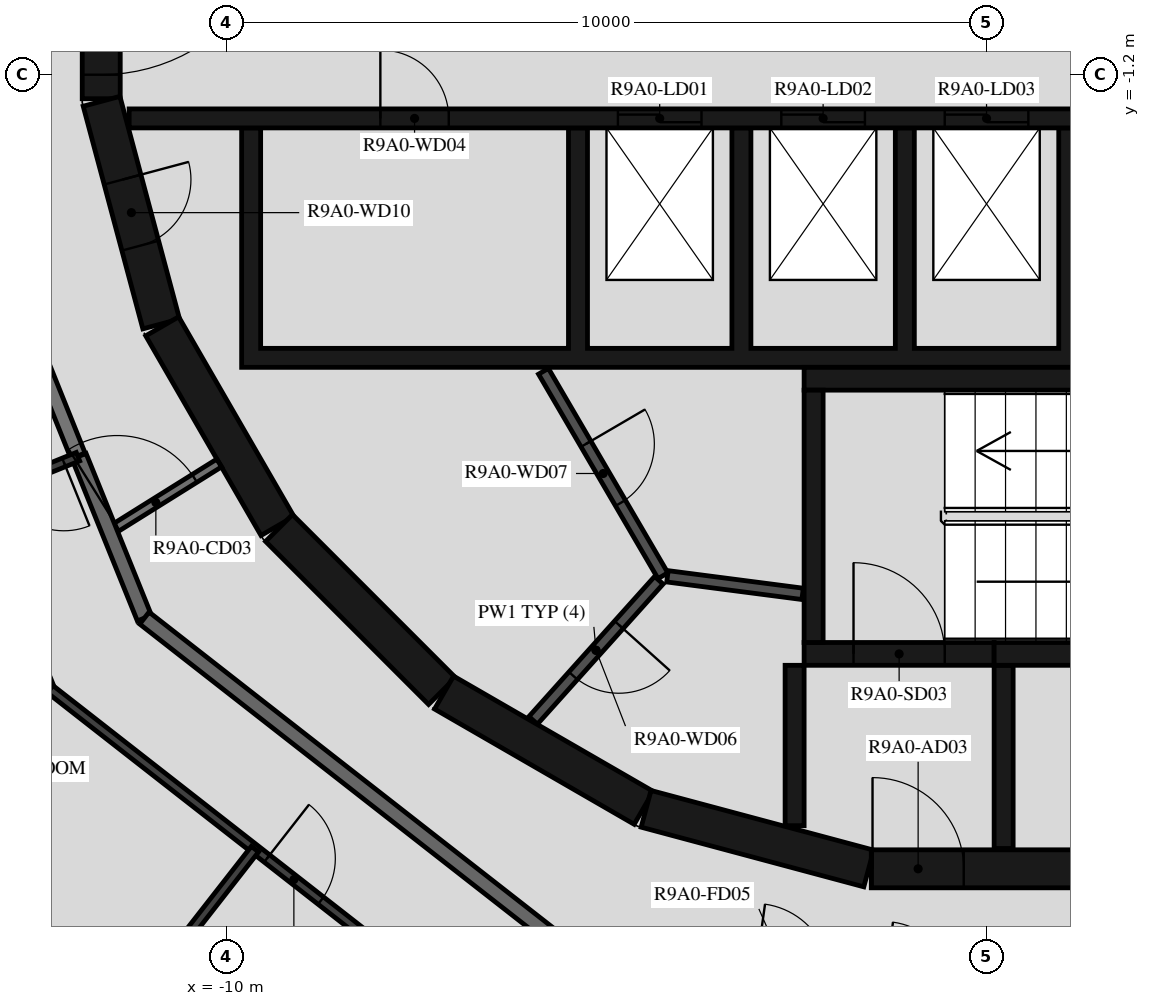
"""IFC4 building model, lengths in metres.
Left out: names, types, materials, properties, quantities, classifications, styles, units other than length and angle.
Written with IfcOpenShell. Run it as: python <this file> out.ifc"""

import sys

from ifc_helpers import new_model, si_unit, direction, frame, frame_2d, origin, place, context, subcontext, project, spatial, polyline, rectangle, outline, extrude, element, fill, save


model = new_model("IFC4")
c1 = context("Model", 3, precision=1e-05, world=origin(), true_north=direction((0.0, 1.0)))
c2 = subcontext(c1, "Body", "Model", "MODEL_VIEW")
j1 = project(units=[si_unit("LENGTHUNIT", "METRE"), si_unit("PLANEANGLEUNIT", "RADIAN")], contexts=[c1])
p1 = place(None, origin())
s1 = spatial("IfcSite", under=j1, at=p1, CompositionType="ELEMENT")
p2 = place(p1, origin())
s2 = spatial("IfcBuilding", under=s1, at=p2, CompositionType="ELEMENT")
p3 = place(p2, frame((0.0, 0.0, 333.0)))
s3 = spatial("IfcBuildingStorey", under=s2, at=p3, CompositionType="ELEMENT", Elevation=333.0)
p4 = place(p3, frame((-11.647, 1.516, 0.0), z_axis=(0.0, 0.0, 1.0), x_axis=(0.0, -1.0, 0.0)))
e1 = element("IfcWall", 1, at=p4, inside=s3, PredefinedType="SHEAR", context=c2, shape_type="SweptSolid", body=[
    extrude(rectangle(XDim=3.033, YDim=0.5, at=frame_2d((1.516, 0.0))), origin(), (0.0, 0.0, 1.0), 3.12),
])
p5 = place(p4, frame((0.316, 0.0, 0.0)))
e2 = element("IfcOpeningElement", 2, at=p5, cuts=e1, PredefinedType="OPENING", context=c2, shape_type="SweptSolid", body=[
    extrude(rectangle(XDim=2.4, YDim=2.1, at=frame_2d((1.2, 1.05))), frame((0.0, 0.26, 0.0), z_axis=(0.0, -1.0, 0.0), x_axis=(1.0, 0.0, 0.0)), (0.0, 0.0, 1.0), 0.52),
])
p6 = place(p3, frame((-11.643, -1.55, 0.0), z_axis=(0.0, 0.0, 1.0), x_axis=(0.258734743916, -0.965948410781, 0.0)))
e3 = element("IfcWall", 3, at=p6, inside=s3, PredefinedType="SHEAR", context=c2, shape_type="SweptSolid", body=[
    extrude(rectangle(XDim=3.033, YDim=0.5, at=frame_2d((1.516, 0.0))), origin(), (0.0, 0.0, 1.0), 3.12),
])
p7 = place(p6, frame((1.066, 0.0, 0.0)))
e4 = element("IfcOpeningElement", 4, at=p7, cuts=e3, PredefinedType="OPENING", context=c2, shape_type="SweptSolid", body=[
    extrude(rectangle(XDim=0.9, YDim=2.1, at=frame_2d((0.45, 1.05))), frame((0.0, 0.26, 0.0), z_axis=(0.0, -1.0, 0.0), x_axis=(1.0, 0.0, 0.0)), (0.0, 0.0, 1.0), 0.52),
])
p8 = place(p3, frame((-10.845, -4.51, 0.0), z_axis=(0.0, 0.0, 1.0), x_axis=(0.500087131594, -0.865975092491, 0.0)))
e5 = element("IfcWall", 5, at=p8, inside=s3, PredefinedType="SHEAR", context=c2, shape_type="SweptSolid", body=[
    extrude(rectangle(XDim=3.033, YDim=0.5, at=frame_2d((1.516, 0.0))), origin(), (0.0, 0.0, 1.0), 3.12),
])
p9 = place(p3, frame((-9.308, -7.164, 0.0), z_axis=(0.0, 0.0, 1.0), x_axis=(0.707106781187, -0.707106781187, 0.0)))
e6 = element("IfcWall", 6, at=p9, inside=s3, PredefinedType="SHEAR", context=c2, shape_type="SweptSolid", body=[
    extrude(rectangle(XDim=3.032, YDim=0.5, at=frame_2d((1.516, 0.0))), origin(), (0.0, 0.0, 1.0), 3.12),
])
for number, where, z_axis, x_axis in (
    (7, (-7.137, -9.329, 0.0), (0.0, 0.0, 1.0), (0.866, -0.5, 0.0)),
    (8, (-4.479, -10.858, 0.0), (0.0, 0.0, 1.0), (0.966, -0.259, 0.0)),
):
    element("IfcWall", number, at=place(p3, frame(where, z_axis=z_axis, x_axis=x_axis)), inside=s3, PredefinedType="SHEAR", context=c2, shape_type="SweptSolid", body=[
        extrude(rectangle(XDim=3.033, YDim=0.5, at=frame_2d((1.516, 0.0))), origin(), (0.0, 0.0, 1.0), 3.12),
    ])
p10 = place(p3, frame((-1.516, -11.647, 0.0), z_axis=(0.0, 0.0, 1.0), x_axis=(1.0, 0.0, 0.0)))
e9 = element("IfcWall", 9, at=p10, inside=s3, PredefinedType="SHEAR", context=c2, shape_type="SweptSolid", body=[
    extrude(rectangle(XDim=3.033, YDim=0.5, at=frame_2d((1.516, 0.0))), origin(), (0.0, 0.0, 1.0), 3.12),
])
p11 = place(p10, frame((0.016, 0.0, 0.0)))
e10 = element("IfcOpeningElement", 10, at=p11, cuts=e9, PredefinedType="OPENING", context=c2, shape_type="SweptSolid", body=[
    extrude(rectangle(XDim=1.2, YDim=2.1, at=frame_2d((0.6, 1.05))), frame((0.0, 0.26, 0.0), z_axis=(0.0, -1.0, 0.0), x_axis=(1.0, 0.0, 0.0)), (0.0, 0.0, 1.0), 0.52),
])
p12 = place(p3, frame((-2.275, -8.67, 0.0), z_axis=(0.0, 0.0, 1.0), x_axis=(0.0, 1.0, 0.0)))
e11 = element("IfcWall", 11, at=p12, inside=s3, PredefinedType="SHEAR", context=c2, shape_type="SweptSolid", body=[
    extrude(rectangle(XDim=3.32, YDim=0.25, at=frame_2d((1.66, 0.0))), origin(), (0.0, 0.0, 1.0), 3.12),
])
p13 = place(p3, frame((-2.4, -5.2, 0.0), z_axis=(0.0, 0.0, 1.0), x_axis=(1.0, 0.0, 0.0)))
e12 = element("IfcWall", 12, at=p13, inside=s3, PredefinedType="SHEAR", context=c2, shape_type="SweptSolid", body=[
    extrude(rectangle(XDim=7.05, YDim=0.3, at=frame_2d((3.525, 0.0))), origin(), (0.0, 0.0, 1.0), 3.12),
])
p14 = place(p3, frame((0.1, -8.82, 0.0), z_axis=(0.0, 0.0, 1.0), x_axis=(1.0, 0.0, 0.0)))
e13 = element("IfcWall", 13, at=p14, inside=s3, PredefinedType="SHEAR", context=c2, shape_type="SweptSolid", body=[
    extrude(rectangle(XDim=4.55, YDim=0.3, at=frame_2d((2.275, 0.0))), origin(), (0.0, 0.0, 1.0), 3.12),
])
p15 = place(p3, frame((-2.4, -8.82, 0.0), z_axis=(0.0, 0.0, 1.0), x_axis=(1.0, 0.0, 0.0)))
e14 = element("IfcWall", 14, at=p15, inside=s3, PredefinedType="SHEAR", context=c2, shape_type="SweptSolid", body=[
    extrude(rectangle(XDim=2.5, YDim=0.3, at=frame_2d((1.25, 0.0))), origin(), (0.0, 0.0, 1.0), 3.12),
])
p16 = place(p15, frame((0.65, 0.0, 0.0)))
e15 = element("IfcOpeningElement", 15, at=p16, cuts=e14, PredefinedType="OPENING", context=c2, shape_type="SweptSolid", body=[
    extrude(rectangle(XDim=1.2, YDim=2.1, at=frame_2d((0.6, 1.05))), frame((0.0, 0.16, 0.0), z_axis=(0.0, -1.0, 0.0), x_axis=(1.0, 0.0, 0.0)), (0.0, 0.0, 1.0), 0.32),
])
p17 = place(p3, frame((-2.525, -8.97, 0.0), z_axis=(0.0, 0.0, 1.0), x_axis=(0.0, -1.0, 0.0)))
e16 = element("IfcWall", 16, at=p17, inside=s3, PredefinedType="SHEAR", context=c2, shape_type="SweptSolid", body=[
    extrude(rectangle(XDim=2.11, YDim=0.25, at=frame_2d((1.055, 0.0))), origin(), (0.0, 0.0, 1.0), 3.12),
])
p18 = place(p3, frame((0.225, -8.97, 0.0), z_axis=(0.0, 0.0, 1.0), x_axis=(0.0, -1.0, 0.0)))
e17 = element("IfcWall", 17, at=p18, inside=s3, PredefinedType="SHEAR", context=c2, shape_type="SweptSolid", body=[
    extrude(rectangle(XDim=2.41, YDim=0.25, at=frame_2d((1.205, 0.0))), origin(), (0.0, 0.0, 1.0), 3.12),
])
p19 = place(p3, origin())
e18 = element("IfcWall", 18, at=p19, inside=s3, PredefinedType="SHEAR", context=c2, shape_type="SweptSolid", body=[
    extrude(outline(polyline([(9.8, -5.05), (9.8, -4.8), (9.8, -1.9), (9.55, -1.9), (9.55, -4.8), (7.65, -4.8), (7.65, -1.9), (7.4, -1.9), (7.4, -4.8), (5.5, -4.8), (5.5, -1.9), (5.25, -1.9), (5.25, -4.8), (3.35, -4.8), (3.35, -1.9), (3.1, -1.9), (3.1, -4.8), (1.2, -4.8), (1.2, -1.9), (0.95, -1.9), (0.95, -4.8), (-0.95, -4.8), (-0.95, -1.9), (-1.2, -1.9), (-1.2, -4.8), (-3.1, -4.8), (-3.1, -1.9), (-3.35, -1.9), (-3.35, -4.8), (-5.25, -4.8), (-5.25, -1.9), (-5.5, -1.9), (-5.5, -4.8), (-9.55, -4.8), (-9.55, -1.9), (-9.8, -1.9), (-9.8, -4.8), (-9.8, -5.05), (9.8, -5.05)])), origin(), (0.0, 0.0, 1.0), 3.12),
])
p20 = place(p3, frame((-11.28, -1.775, 0.0), z_axis=(0.0, 0.0, 1.0), x_axis=(1.0, 0.0, 0.0)))
e19 = element("IfcWall", 19, at=p20, inside=s3, PredefinedType="SHEAR", context=c2, shape_type="SweptSolid", body=[
    extrude(rectangle(XDim=14.38, YDim=0.25, at=frame_2d((7.19, 0.0))), origin(), (0.0, 0.0, 1.0), 3.12),
])
p21 = place(p20, frame((6.43, 0.0, 0.0)))
e20 = element("IfcOpeningElement", 20, at=p21, cuts=e19, PredefinedType="OPENING", context=c2, shape_type="SweptSolid", body=[
    extrude(rectangle(XDim=1.1, YDim=2.1, at=frame_2d((0.55, 1.05))), frame((0.0, 0.135, 0.0), z_axis=(0.0, -1.0, 0.0), x_axis=(1.0, 0.0, 0.0)), (0.0, 0.0, 1.0), 0.27),
])
p22 = place(p20, frame((8.58, 0.0, 0.0)))
e21 = element("IfcOpeningElement", 21, at=p22, cuts=e19, PredefinedType="OPENING", context=c2, shape_type="SweptSolid", body=[
    extrude(rectangle(XDim=1.1, YDim=2.1, at=frame_2d((0.55, 1.05))), frame((0.0, 0.135, 0.0), z_axis=(0.0, -1.0, 0.0), x_axis=(1.0, 0.0, 0.0)), (0.0, 0.0, 1.0), 0.27),
])
p23 = place(p20, frame((10.73, 0.0, 0.0)))
e22 = element("IfcOpeningElement", 22, at=p23, cuts=e19, PredefinedType="OPENING", context=c2, shape_type="SweptSolid", body=[
    extrude(rectangle(XDim=1.1, YDim=2.1, at=frame_2d((0.55, 1.05))), frame((0.0, 0.135, 0.0), z_axis=(0.0, -1.0, 0.0), x_axis=(1.0, 0.0, 0.0)), (0.0, 0.0, 1.0), 0.27),
])
p24 = place(p20, frame((3.305, 0.0, 0.0)))
e23 = element("IfcOpeningElement", 23, at=p24, cuts=e19, PredefinedType="OPENING", context=c2, shape_type="SweptSolid", body=[
    extrude(rectangle(XDim=0.9, YDim=2.1, at=frame_2d((0.45, 1.05))), frame((0.0, 0.135, 0.0), z_axis=(0.0, -1.0, 0.0), x_axis=(1.0, 0.0, 0.0)), (0.0, 0.0, 1.0), 0.27),
])
p25 = place(p20, frame((12.98, 0.0, 0.0)))
e24 = element("IfcOpeningElement", 24, at=p25, cuts=e19, PredefinedType="OPENING", context=c2, shape_type="SweptSolid", body=[
    extrude(rectangle(XDim=0.9, YDim=2.1, at=frame_2d((0.45, 1.05))), frame((0.0, 0.135, 0.0), z_axis=(0.0, -1.0, 0.0), x_axis=(1.0, 0.0, 0.0)), (0.0, 0.0, 1.0), 0.27),
])
p26 = place(p3, frame((-5.829, -5.102, 0.0), z_axis=(0.0, 0.0, 1.0), x_axis=(0.504480008384, -0.863423373057, 0.0)))
e25 = element("IfcWall", 25, at=p26, inside=s3, PredefinedType="PARTITIONING", context=c2, shape_type="SweptSolid", body=[
    extrude(rectangle(XDim=3.115, YDim=0.15, at=frame_2d((1.558, 0.0))), origin(), (0.0, 0.0, 1.0), 3.12),
])
p27 = place(p26, frame((1.107, 0.0, 0.0)))
e26 = element("IfcOpeningElement", 26, at=p27, cuts=e25, PredefinedType="OPENING", context=c2, shape_type="SweptSolid", body=[
    extrude(rectangle(XDim=0.9, YDim=2.1, at=frame_2d((0.45, 1.05))), frame((0.0, 0.085, 0.0), z_axis=(0.0, -1.0, 0.0), x_axis=(1.0, 0.0, 0.0)), (0.0, 0.0, 1.0), 0.17),
])
p28 = place(p3, frame((-4.311, -7.851, 0.0), z_axis=(0.0, 0.0, 1.0), x_axis=(-0.667869133096, -0.744278725383, 0.0)))
e27 = element("IfcWall", 27, at=p28, inside=s3, PredefinedType="PARTITIONING", context=c2, shape_type="SweptSolid", body=[
    extrude(rectangle(XDim=2.476, YDim=0.15, at=frame_2d((1.238, 0.0))), origin(), (0.0, 0.0, 1.0), 3.12),
])
p29 = place(p28, frame((0.788, 0.0, 0.0)))
e28 = element("IfcOpeningElement", 28, at=p29, cuts=e27, PredefinedType="OPENING", context=c2, shape_type="SweptSolid", body=[
    extrude(rectangle(XDim=0.9, YDim=2.1, at=frame_2d((0.45, 1.05))), frame((0.0, 0.085, 0.0), z_axis=(0.0, -1.0, 0.0), x_axis=(1.0, 0.0, 0.0)), (0.0, 0.0, 1.0), 0.17),
])
p30 = place(p3, frame((-4.198, -7.799, 0.0), z_axis=(0.0, 0.0, 1.0), x_axis=(0.991686747293, -0.128675542523, 0.0)))
e29 = element("IfcWall", 29, at=p30, inside=s3, PredefinedType="PARTITIONING", context=c2, shape_type="SweptSolid", body=[
    extrude(rectangle(XDim=1.793, YDim=0.15, at=frame_2d((0.896, 0.0))), origin(), (0.0, 0.0, 1.0), 3.12),
])
p31 = place(p3, frame((-11.539, -7.21, 0.0), z_axis=(0.0, 0.0, 1.0), x_axis=(0.848103039868, 0.529831325769, 0.0)))
e30 = element("IfcWall", 30, at=p31, inside=s3, PredefinedType="PARTITIONING", context=c2, shape_type="SweptSolid", body=[
    extrude(rectangle(XDim=1.702, YDim=0.12, at=frame_2d((0.851, 0.0))), origin(), (0.0, 0.0, 1.0), 3.12),
])
p32 = place(p31, frame((0.12, 0.0, 0.0)))
e31 = element("IfcOpeningElement", 31, at=p32, cuts=e30, PredefinedType="OPENING", context=c2, shape_type="SweptSolid", body=[
    extrude(rectangle(XDim=1.2, YDim=2.1, at=frame_2d((0.6, 1.05))), frame((0.0, 0.07, 0.0), z_axis=(0.0, -1.0, 0.0), x_axis=(1.0, 0.0, 0.0)), (0.0, 0.0, 1.0), 0.14),
])
p33 = place(p3, frame((-13.769, -1.691, 0.0), z_axis=(0.0, 0.0, 1.0), x_axis=(0.372720094028, -0.927943819155, 0.0)))
e32 = element("IfcWall", 32, at=p33, inside=s3, PredefinedType="STANDARD", context=c2, shape_type="SweptSolid", body=[
    extrude(rectangle(XDim=4.875, YDim=0.2, at=frame_2d((2.438, 0.0))), origin(), (0.0, 0.0, 1.0), 3.12),
])
p34 = place(p3, frame((-11.939, -6.22, 0.0), z_axis=(0.0, 0.0, 1.0), x_axis=(0.374651128394, -0.927165860024, 0.0)))
e33 = element("IfcWall", 33, at=p34, inside=s3, PredefinedType="STANDARD", context=c2, shape_type="SweptSolid", body=[
    extrude(rectangle(XDim=2.296, YDim=0.2, at=frame_2d((1.148, 0.0))), origin(), (0.0, 0.0, 1.0), 3.12),
])
p35 = place(p3, frame((-11.079, -8.349, 0.0), z_axis=(0.0, 0.0, 1.0), x_axis=(0.78800478687, -0.615669112324, 0.0)))
e34 = element("IfcWall", 34, at=p35, inside=s3, PredefinedType="STANDARD", context=c2, shape_type="SweptSolid", body=[
    extrude(rectangle(XDim=7.181, YDim=0.2, at=frame_2d((3.591, 0.0))), origin(), (0.0, 0.0, 1.0), 3.12),
])
p36 = place(p3, frame((-11.953, -6.225, 0.0), z_axis=(0.0, 0.0, 1.0), x_axis=(-0.927144096717, -0.374704982518, 0.0)))
e35 = element("IfcWall", 35, at=p36, inside=s3, PredefinedType="PARTITIONING", context=c2, shape_type="SweptSolid", body=[
    extrude(rectangle(XDim=1.485, YDim=0.12, at=frame_2d((0.742, 0.0))), origin(), (0.0, 0.0, 1.0), 3.12),
])
p37 = place(p36, frame((0.2, 0.0, 0.0)))
e36 = element("IfcOpeningElement", 36, at=p37, cuts=e35, PredefinedType="OPENING", context=c2, shape_type="SweptSolid", body=[
    extrude(rectangle(XDim=0.9, YDim=2.1, at=frame_2d((0.45, 1.05))), frame((0.0, 0.07, 0.0), z_axis=(0.0, -1.0, 0.0), x_axis=(1.0, 0.0, 0.0)), (0.0, 0.0, 1.0), 0.14),
])
p38 = place(p3, frame((-13.33, -6.782, 0.0), z_axis=(0.0, 0.0, 1.0), x_axis=(0.374602180132, -0.927185637637, 0.0)))
e37 = element("IfcWall", 37, at=p38, inside=s3, PredefinedType="PARTITIONING", context=c2, shape_type="SweptSolid", body=[
    extrude(rectangle(XDim=2.698, YDim=0.12, at=frame_2d((1.349, 0.0))), origin(), (0.0, 0.0, 1.0), 3.12),
])
p39 = place(p3, frame((-12.319, -9.283, 0.0), z_axis=(0.0, 0.0, 1.0), x_axis=(0.788000268464, -0.61567489546, 0.0)))
e38 = element("IfcWall", 38, at=p39, inside=s3, PredefinedType="PARTITIONING", context=c2, shape_type="SweptSolid", body=[
    extrude(rectangle(XDim=7.985, YDim=0.12, at=frame_2d((3.992, 0.0))), origin(), (0.0, 0.0, 1.0), 3.12),
])
p40 = place(p39, frame((3.619, 0.0, 0.0)))
e39 = element("IfcOpeningElement", 39, at=p40, cuts=e38, PredefinedType="OPENING", context=c2, shape_type="SweptSolid", body=[
    extrude(rectangle(XDim=0.9, YDim=2.1, at=frame_2d((0.45, 1.05))), frame((0.0, 0.07, 0.0), z_axis=(0.0, -1.0, 0.0), x_axis=(1.0, 0.0, 0.0)), (0.0, 0.0, 1.0), 0.14),
])
p41 = place(p3, frame((-12.219, -14.708, 0.0), z_axis=(0.0, 0.0, 1.0), x_axis=(0.615656413137, 0.788014708596, 0.0)))
e40 = element("IfcWall", 40, at=p41, inside=s3, PredefinedType="PARTITIONING", context=c2, shape_type="SweptSolid", body=[
    extrude(rectangle(XDim=4.213, YDim=0.12, at=frame_2d((2.106, 0.0))), origin(), (0.0, 0.0, 1.0), 3.12),
])
p42 = place(p16, origin())
e41 = element("IfcDoor", 41, at=p42, inside=s3, OperationType="SINGLE_SWING_LEFT", PredefinedType="DOOR", context=c2, shape_type="SweptSolid", body=[
    extrude(rectangle(XDim=1.2, YDim=2.1, at=frame_2d((0.6, 1.05))), frame((0.0, 0.025, 0.0), z_axis=(0.0, -1.0, 0.0), x_axis=(1.0, 0.0, 0.0)), (0.0, 0.0, 1.0), 0.05),
])
fill(e15, e41)
p43 = place(p11, origin())
e42 = element("IfcDoor", 42, at=p43, inside=s3, OperationType="SINGLE_SWING_RIGHT", PredefinedType="DOOR", context=c2, shape_type="SweptSolid", body=[
    extrude(rectangle(XDim=1.2, YDim=2.1, at=frame_2d((0.6, 1.05))), frame((0.0, 0.025, 0.0), z_axis=(0.0, -1.0, 0.0), x_axis=(1.0, 0.0, 0.0)), (0.0, 0.0, 1.0), 0.05),
])
fill(e10, e42)
p44 = place(p5, origin())
e43 = element("IfcDoor", 43, at=p44, inside=s3, OperationType="DOUBLE_DOOR_SINGLE_SWING", PredefinedType="DOOR", context=c2, shape_type="SweptSolid", body=[
    extrude(rectangle(XDim=2.4, YDim=2.1, at=frame_2d((1.2, 1.05))), frame((0.0, 0.025, 0.0), z_axis=(0.0, -1.0, 0.0), x_axis=(1.0, 0.0, 0.0)), (0.0, 0.0, 1.0), 0.05),
])
fill(e2, e43)
p45 = place(p21, origin())
e44 = element("IfcDoor", 44, at=p45, inside=s3, OperationType="DOUBLE_DOOR_SLIDING", PredefinedType="DOOR", context=c2, shape_type="SweptSolid", body=[
    extrude(rectangle(XDim=1.1, YDim=2.1, at=frame_2d((0.55, 1.05))), frame((0.0, 0.025, 0.0), z_axis=(0.0, -1.0, 0.0), x_axis=(1.0, 0.0, 0.0)), (0.0, 0.0, 1.0), 0.05),
])
fill(e20, e44)
p46 = place(p22, origin())
e45 = element("IfcDoor", 45, at=p46, inside=s3, OperationType="DOUBLE_DOOR_SLIDING", PredefinedType="DOOR", context=c2, shape_type="SweptSolid", body=[
    extrude(rectangle(XDim=1.1, YDim=2.1, at=frame_2d((0.55, 1.05))), frame((0.0, 0.025, 0.0), z_axis=(0.0, -1.0, 0.0), x_axis=(1.0, 0.0, 0.0)), (0.0, 0.0, 1.0), 0.05),
])
fill(e21, e45)
p47 = place(p23, origin())
e46 = element("IfcDoor", 46, at=p47, inside=s3, OperationType="DOUBLE_DOOR_SLIDING", PredefinedType="DOOR", context=c2, shape_type="SweptSolid", body=[
    extrude(rectangle(XDim=1.1, YDim=2.1, at=frame_2d((0.55, 1.05))), frame((0.0, 0.025, 0.0), z_axis=(0.0, -1.0, 0.0), x_axis=(1.0, 0.0, 0.0)), (0.0, 0.0, 1.0), 0.05),
])
fill(e22, e46)
p48 = place(p24, origin())
e47 = element("IfcDoor", 47, at=p48, inside=s3, OperationType="SINGLE_SWING_RIGHT", PredefinedType="DOOR", context=c2, shape_type="SweptSolid", body=[
    extrude(rectangle(XDim=0.9, YDim=2.1, at=frame_2d((0.45, 1.05))), frame((0.0, 0.025, 0.0), z_axis=(0.0, -1.0, 0.0), x_axis=(1.0, 0.0, 0.0)), (0.0, 0.0, 1.0), 0.05),
])
fill(e23, e47)
p49 = place(p29, origin())
e48 = element("IfcDoor", 48, at=p49, inside=s3, OperationType="SINGLE_SWING_RIGHT", PredefinedType="DOOR", context=c2, shape_type="SweptSolid", body=[
    extrude(rectangle(XDim=0.9, YDim=2.1, at=frame_2d((0.45, 1.05))), frame((0.0, 0.025, 0.0), z_axis=(0.0, -1.0, 0.0), x_axis=(1.0, 0.0, 0.0)), (0.0, 0.0, 1.0), 0.05),
])
fill(e28, e48)
p50 = place(p27, origin())
e49 = element("IfcDoor", 49, at=p50, inside=s3, OperationType="SINGLE_SWING_LEFT", PredefinedType="DOOR", context=c2, shape_type="SweptSolid", body=[
    extrude(rectangle(XDim=0.9, YDim=2.1, at=frame_2d((0.45, 1.05))), frame((0.0, 0.025, 0.0), z_axis=(0.0, -1.0, 0.0), x_axis=(1.0, 0.0, 0.0)), (0.0, 0.0, 1.0), 0.05),
])
fill(e26, e49)
p51 = place(p7, origin())
e50 = element("IfcDoor", 50, at=p51, inside=s3, OperationType="SINGLE_SWING_RIGHT", PredefinedType="DOOR", context=c2, shape_type="SweptSolid", body=[
    extrude(rectangle(XDim=0.9, YDim=2.1, at=frame_2d((0.45, 1.05))), frame((0.0, 0.025, 0.0), z_axis=(0.0, -1.0, 0.0), x_axis=(1.0, 0.0, 0.0)), (0.0, 0.0, 1.0), 0.05),
])
fill(e4, e50)
p52 = place(p37, origin())
e51 = element("IfcDoor", 51, at=p52, inside=s3, OperationType="SINGLE_SWING_LEFT", PredefinedType="DOOR", context=c2, shape_type="SweptSolid", body=[
    extrude(rectangle(XDim=0.9, YDim=2.1, at=frame_2d((0.45, 1.05))), frame((0.0, 0.025, 0.0), z_axis=(0.0, -1.0, 0.0), x_axis=(1.0, 0.0, 0.0)), (0.0, 0.0, 1.0), 0.05),
])
fill(e36, e51)
p53 = place(p40, origin())
e52 = element("IfcDoor", 52, at=p53, inside=s3, OperationType="SINGLE_SWING_RIGHT", PredefinedType="DOOR", context=c2, shape_type="SweptSolid", body=[
    extrude(rectangle(XDim=0.9, YDim=2.1, at=frame_2d((0.45, 1.05))), frame((0.0, 0.025, 0.0), z_axis=(0.0, -1.0, 0.0), x_axis=(1.0, 0.0, 0.0)), (0.0, 0.0, 1.0), 0.05),
])
fill(e39, e52)
p54 = place(p32, origin())
e53 = element("IfcDoor", 53, at=p54, inside=s3, OperationType="DOUBLE_DOOR_SINGLE_SWING", PredefinedType="DOOR", context=c2, shape_type="SweptSolid", body=[
    extrude(rectangle(XDim=1.2, YDim=2.1, at=frame_2d((0.6, 1.05))), frame((0.0, 0.025, 0.0), z_axis=(0.0, -1.0, 0.0), x_axis=(1.0, 0.0, 0.0)), (0.0, 0.0, 1.0), 0.05),
])
fill(e31, e53)
save(model, sys.argv[1])
